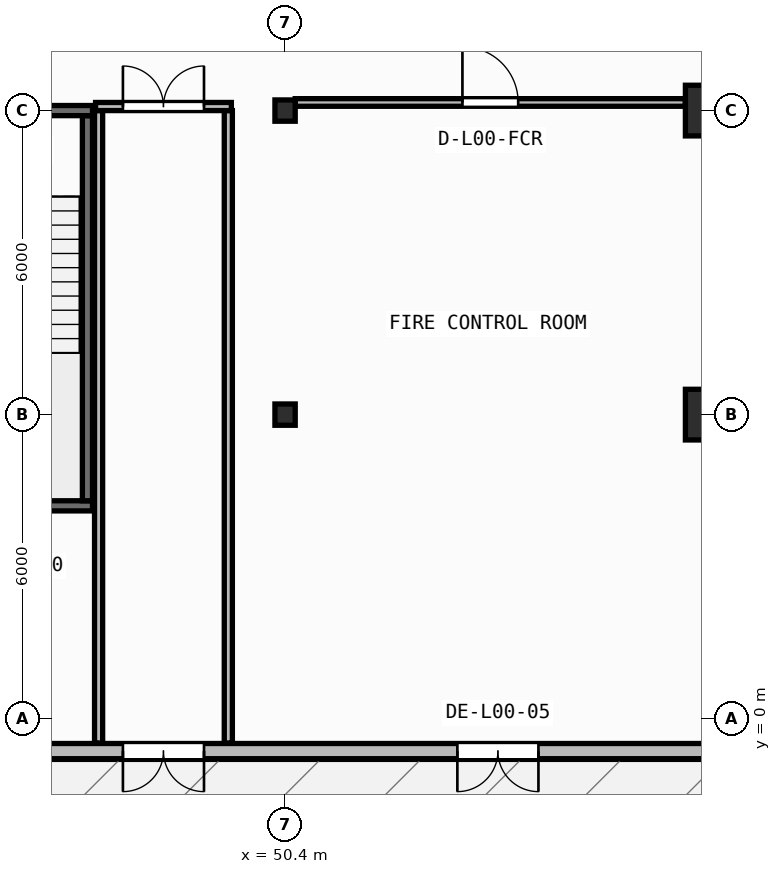
"""IFC4 building model, lengths in metres.
Left out: names, types, materials, properties, quantities, classifications, styles, units other than length and angle.
Written with IfcOpenShell. Run it as: python <this file> out.ifc"""

import sys

from ifc_helpers import new_model, si_unit, direction, frame, frame_2d, origin, origin_2d, place, context, subcontext, project, spatial, rectangle, circle, i_section, extrude, element, fill, save


model = new_model("IFC4")
c1 = context("Model", 3, precision=1e-05, world=origin(), true_north=direction((0.0, 1.0)))
c2 = subcontext(c1, "Body", "Model", "MODEL_VIEW")
j1 = project(units=[si_unit("LENGTHUNIT", "METRE"), si_unit("PLANEANGLEUNIT", "RADIAN")], contexts=[c1])
p1 = place(None, origin())
s1 = spatial("IfcSite", under=j1, at=p1, CompositionType="ELEMENT")
p2 = place(p1, origin())
s2 = spatial("IfcBuilding", under=s1, at=p2, CompositionType="ELEMENT")
p3 = place(p2, origin())
s3 = spatial("IfcBuildingStorey", under=s2, at=p3, CompositionType="ELEMENT", Elevation=0.0)
p4 = place(p3, frame((50.4, 6.0, 0.0), z_axis=(0.0, 0.0, 1.0), x_axis=(1.0, 0.0, 0.0)))
e1 = element("IfcColumn", 1, at=p4, inside=s3, PredefinedType="COLUMN", context=c2, shape_type="SweptSolid", body=[
    extrude(i_section(OverallWidth=0.4, OverallDepth=0.42, WebThickness=0.025, FlangeThickness=0.04, at=origin_2d()), origin(), (0.0, 0.0, 1.0), 4.5),
])
p5 = place(p3, frame((58.8, 6.0, 0.0), z_axis=(0.0, 0.0, 1.0), x_axis=(1.0, 0.0, 0.0)))
e2 = element("IfcColumn", 2, at=p5, inside=s3, PredefinedType="COLUMN", context=c2, shape_type="SweptSolid", body=[
    extrude(circle(Radius=0.5, at=origin_2d()), origin(), (0.0, 0.0, 1.0), 4.5),
])
p6 = place(p3, frame((50.4, 12.0, 0.0), z_axis=(0.0, 0.0, 1.0), x_axis=(1.0, 0.0, 0.0)))
e3 = element("IfcColumn", 3, at=p6, inside=s3, PredefinedType="COLUMN", context=c2, shape_type="SweptSolid", body=[
    extrude(i_section(OverallWidth=0.4, OverallDepth=0.42, WebThickness=0.025, FlangeThickness=0.04, at=origin_2d()), origin(), (0.0, 0.0, 1.0), 4.5),
])
p7 = place(p3, frame((58.8, 12.0, 0.0), z_axis=(0.0, 0.0, 1.0), x_axis=(1.0, 0.0, 0.0)))
e4 = element("IfcColumn", 4, at=p7, inside=s3, PredefinedType="COLUMN", context=c2, shape_type="SweptSolid", body=[
    extrude(circle(Radius=0.5, at=origin_2d()), origin(), (0.0, 0.0, 1.0), 4.5),
])
p8 = place(p3, frame((85.44, -0.64, 0.0), z_axis=(0.0, 0.0, 1.0), x_axis=(-1.0, 0.0, 0.0)))
e5 = element("IfcWall", 5, at=p8, inside=s3, PredefinedType="STANDARD", context=c2, shape_type="SweptSolid", body=[
    extrude(rectangle(XDim=85.48, YDim=0.3, at=frame_2d((42.74, 0.0))), origin(), (0.0, 0.0, 1.0), 4.25),
])
p9 = place(p8, frame((72.04, 0.0, 0.0)))
e6 = element("IfcOpeningElement", 6, at=p9, cuts=e5, PredefinedType="OPENING", context=c2, shape_type="SweptSolid", body=[
    extrude(rectangle(XDim=1.6, YDim=2.2, at=frame_2d((0.8, 1.1))), frame((0.0, 0.16, 0.0), z_axis=(0.0, -1.0, 0.0), x_axis=(1.0, 0.0, 0.0)), (0.0, 0.0, 1.0), 0.32),
])
p10 = place(p8, frame((55.24, 0.0, 0.0)))
e7 = element("IfcOpeningElement", 7, at=p10, cuts=e5, PredefinedType="OPENING", context=c2, shape_type="SweptSolid", body=[
    extrude(rectangle(XDim=1.6, YDim=2.2, at=frame_2d((0.8, 1.1))), frame((0.0, 0.16, 0.0), z_axis=(0.0, -1.0, 0.0), x_axis=(1.0, 0.0, 0.0)), (0.0, 0.0, 1.0), 0.32),
])
p11 = place(p8, frame((46.84, 0.0, 0.0)))
e8 = element("IfcOpeningElement", 8, at=p11, cuts=e5, PredefinedType="OPENING", context=c2, shape_type="SweptSolid", body=[
    extrude(rectangle(XDim=1.6, YDim=2.2, at=frame_2d((0.8, 1.1))), frame((0.0, 0.16, 0.0), z_axis=(0.0, -1.0, 0.0), x_axis=(1.0, 0.0, 0.0)), (0.0, 0.0, 1.0), 0.32),
])
p12 = place(p8, frame((36.64, 0.0, 0.0)))
e9 = element("IfcOpeningElement", 9, at=p12, cuts=e5, PredefinedType="OPENING", context=c2, shape_type="SweptSolid", body=[
    extrude(rectangle(XDim=1.6, YDim=2.2, at=frame_2d((0.8, 1.1))), frame((0.0, 0.16, 0.0), z_axis=(0.0, -1.0, 0.0), x_axis=(1.0, 0.0, 0.0)), (0.0, 0.0, 1.0), 0.32),
])
p13 = place(p8, frame((30.04, 0.0, 0.0)))
e10 = element("IfcOpeningElement", 10, at=p13, cuts=e5, PredefinedType="OPENING", context=c2, shape_type="SweptSolid", body=[
    extrude(rectangle(XDim=1.6, YDim=2.2, at=frame_2d((0.8, 1.1))), frame((0.0, 0.16, 0.0), z_axis=(0.0, -1.0, 0.0), x_axis=(1.0, 0.0, 0.0)), (0.0, 0.0, 1.0), 0.32),
])
p14 = place(p8, frame((22.24, 0.0, 0.0)))
e11 = element("IfcOpeningElement", 11, at=p14, cuts=e5, PredefinedType="OPENING", context=c2, shape_type="SweptSolid", body=[
    extrude(rectangle(XDim=1.6, YDim=2.2, at=frame_2d((0.8, 1.1))), frame((0.0, 0.16, 0.0), z_axis=(0.0, -1.0, 0.0), x_axis=(1.0, 0.0, 0.0)), (0.0, 0.0, 1.0), 0.32),
])
p15 = place(p8, frame((4.84, 0.0, 0.0)))
e12 = element("IfcOpeningElement", 12, at=p15, cuts=e5, PredefinedType="OPENING", context=c2, shape_type="SweptSolid", body=[
    extrude(rectangle(XDim=1.6, YDim=2.2, at=frame_2d((0.8, 1.1))), frame((0.0, 0.16, 0.0), z_axis=(0.0, -1.0, 0.0), x_axis=(1.0, 0.0, 0.0)), (0.0, 0.0, 1.0), 0.32),
])
p16 = place(p3, frame((42.9, 4.2, 0.0), z_axis=(0.0, 0.0, 1.0), x_axis=(1.0, 0.0, 0.0)))
e13 = element("IfcWall", 13, at=p16, inside=s3, PredefinedType="SHEAR", context=c2, shape_type="SweptSolid", body=[
    extrude(rectangle(XDim=3.7, YDim=0.2, at=frame_2d((1.85, 0.0))), origin(), (0.0, 0.0, 1.0), 4.25),
])
p17 = place(p3, frame((46.5, 4.3, 0.0), z_axis=(0.0, 0.0, 1.0), x_axis=(0.0, 1.0, 0.0)))
e14 = element("IfcWall", 14, at=p17, inside=s3, PredefinedType="SHEAR", context=c2, shape_type="SweptSolid", body=[
    extrude(rectangle(XDim=7.6, YDim=0.2, at=frame_2d((3.8, 0.0))), origin(), (0.0, 0.0, 1.0), 4.25),
])
p18 = place(p3, frame((42.9, 12.0, 0.0), z_axis=(0.0, 0.0, 1.0), x_axis=(1.0, 0.0, 0.0)))
e15 = element("IfcWall", 15, at=p18, inside=s3, PredefinedType="SHEAR", context=c2, shape_type="SweptSolid", body=[
    extrude(rectangle(XDim=3.7, YDim=0.2, at=frame_2d((1.85, 0.0))), origin(), (0.0, 0.0, 1.0), 4.25),
])
p19 = place(p18, frame((1.2, 0.0, 0.0)))
e16 = element("IfcOpeningElement", 16, at=p19, cuts=e15, PredefinedType="OPENING", context=c2, shape_type="SweptSolid", body=[
    extrude(rectangle(XDim=1.3, YDim=2.15, at=frame_2d((0.65, 1.075))), frame((0.0, 0.11, 0.0), z_axis=(0.0, -1.0, 0.0), x_axis=(1.0, 0.0, 0.0)), (0.0, 0.0, 1.0), 0.22),
])
for number, where, z_axis, x_axis in (
    (17, (46.72, -0.48, 0.0), (0.0, 0.0, 1.0), (0.0, 1.0, 0.0)),
    (18, (49.28, -0.48, 0.0), (0.0, 0.0, 1.0), (0.0, 1.0, 0.0)),
):
    element("IfcWall", number, at=place(p3, frame(where, z_axis=z_axis, x_axis=x_axis)), inside=s3, PredefinedType="PARTITIONING", context=c2, shape_type="SweptSolid", body=[
        extrude(rectangle(XDim=12.48, YDim=0.16, at=frame_2d((6.24, 0.0))), origin(), (0.0, 0.0, 1.0), 4.25),
    ])
p20 = place(p3, frame((46.66, 12.08, 0.0), z_axis=(0.0, 0.0, 1.0), x_axis=(1.0, 0.0, 0.0)))
e19 = element("IfcWall", 19, at=p20, inside=s3, PredefinedType="PARTITIONING", context=c2, shape_type="SweptSolid", body=[
    extrude(rectangle(XDim=2.68, YDim=0.16, at=frame_2d((1.34, 0.0))), origin(), (0.0, 0.0, 1.0), 3.425),
])
p21 = place(p20, frame((0.54, 0.0, 0.0)))
e20 = element("IfcOpeningElement", 20, at=p21, cuts=e19, PredefinedType="OPENING", context=c2, shape_type="SweptSolid", body=[
    extrude(rectangle(XDim=1.6, YDim=2.05, at=frame_2d((0.8, 1.025))), frame((0.0, 0.09, 0.0), z_axis=(0.0, -1.0, 0.0), x_axis=(1.0, 0.0, 0.0)), (0.0, 0.0, 1.0), 0.18),
])
p22 = place(p3, frame((50.6, 12.16, 0.0), z_axis=(0.0, 0.0, 1.0), x_axis=(1.0, 0.0, 0.0)))
e21 = element("IfcWall", 21, at=p22, inside=s3, PredefinedType="PARTITIONING", context=c2, shape_type="SweptSolid", body=[
    extrude(rectangle(XDim=7.7, YDim=0.15, at=frame_2d((3.85, 0.0))), origin(), (0.0, 0.0, 1.0), 3.425),
])
p23 = place(p22, frame((3.3, 0.0, 0.0)))
e22 = element("IfcOpeningElement", 22, at=p23, cuts=e21, PredefinedType="OPENING", context=c2, shape_type="SweptSolid", body=[
    extrude(rectangle(XDim=1.1, YDim=2.1, at=frame_2d((0.55, 1.05))), frame((0.0, 0.085, 0.0), z_axis=(0.0, -1.0, 0.0), x_axis=(1.0, 0.0, 0.0)), (0.0, 0.0, 1.0), 0.17),
])
p24 = place(p12, origin())
e23 = element("IfcDoor", 23, at=p24, inside=s3, OperationType="DOUBLE_DOOR_SINGLE_SWING", PredefinedType="DOOR", context=c2, shape_type="SweptSolid", body=[
    extrude(rectangle(XDim=1.6, YDim=2.2, at=frame_2d((0.8, 1.1))), frame((0.0, 0.025, 0.0), z_axis=(0.0, -1.0, 0.0), x_axis=(1.0, 0.0, 0.0)), (0.0, 0.0, 1.0), 0.05),
])
fill(e9, e23)
p25 = place(p13, origin())
e24 = element("IfcDoor", 24, at=p25, inside=s3, OperationType="DOUBLE_DOOR_SINGLE_SWING", PredefinedType="DOOR", context=c2, shape_type="SweptSolid", body=[
    extrude(rectangle(XDim=1.6, YDim=2.2, at=frame_2d((0.8, 1.1))), frame((0.0, 0.025, 0.0), z_axis=(0.0, -1.0, 0.0), x_axis=(1.0, 0.0, 0.0)), (0.0, 0.0, 1.0), 0.05),
])
fill(e10, e24)
p26 = place(p21, origin())
e25 = element("IfcDoor", 25, at=p26, inside=s3, OperationType="DOUBLE_DOOR_SINGLE_SWING", PredefinedType="DOOR", context=c2, shape_type="SweptSolid", body=[
    extrude(rectangle(XDim=1.6, YDim=2.05, at=frame_2d((0.8, 1.025))), frame((0.0, 0.025, 0.0), z_axis=(0.0, -1.0, 0.0), x_axis=(1.0, 0.0, 0.0)), (0.0, 0.0, 1.0), 0.05),
])
fill(e20, e25)
p27 = place(p23, origin())
e26 = element("IfcDoor", 26, at=p27, inside=s3, OperationType="SINGLE_SWING_LEFT", PredefinedType="DOOR", context=c2, shape_type="SweptSolid", body=[
    extrude(rectangle(XDim=1.1, YDim=2.1, at=frame_2d((0.55, 1.05))), frame((0.0, 0.025, 0.0), z_axis=(0.0, -1.0, 0.0), x_axis=(1.0, 0.0, 0.0)), (0.0, 0.0, 1.0), 0.05),
])
fill(e22, e26)
save(model, sys.argv[1])
